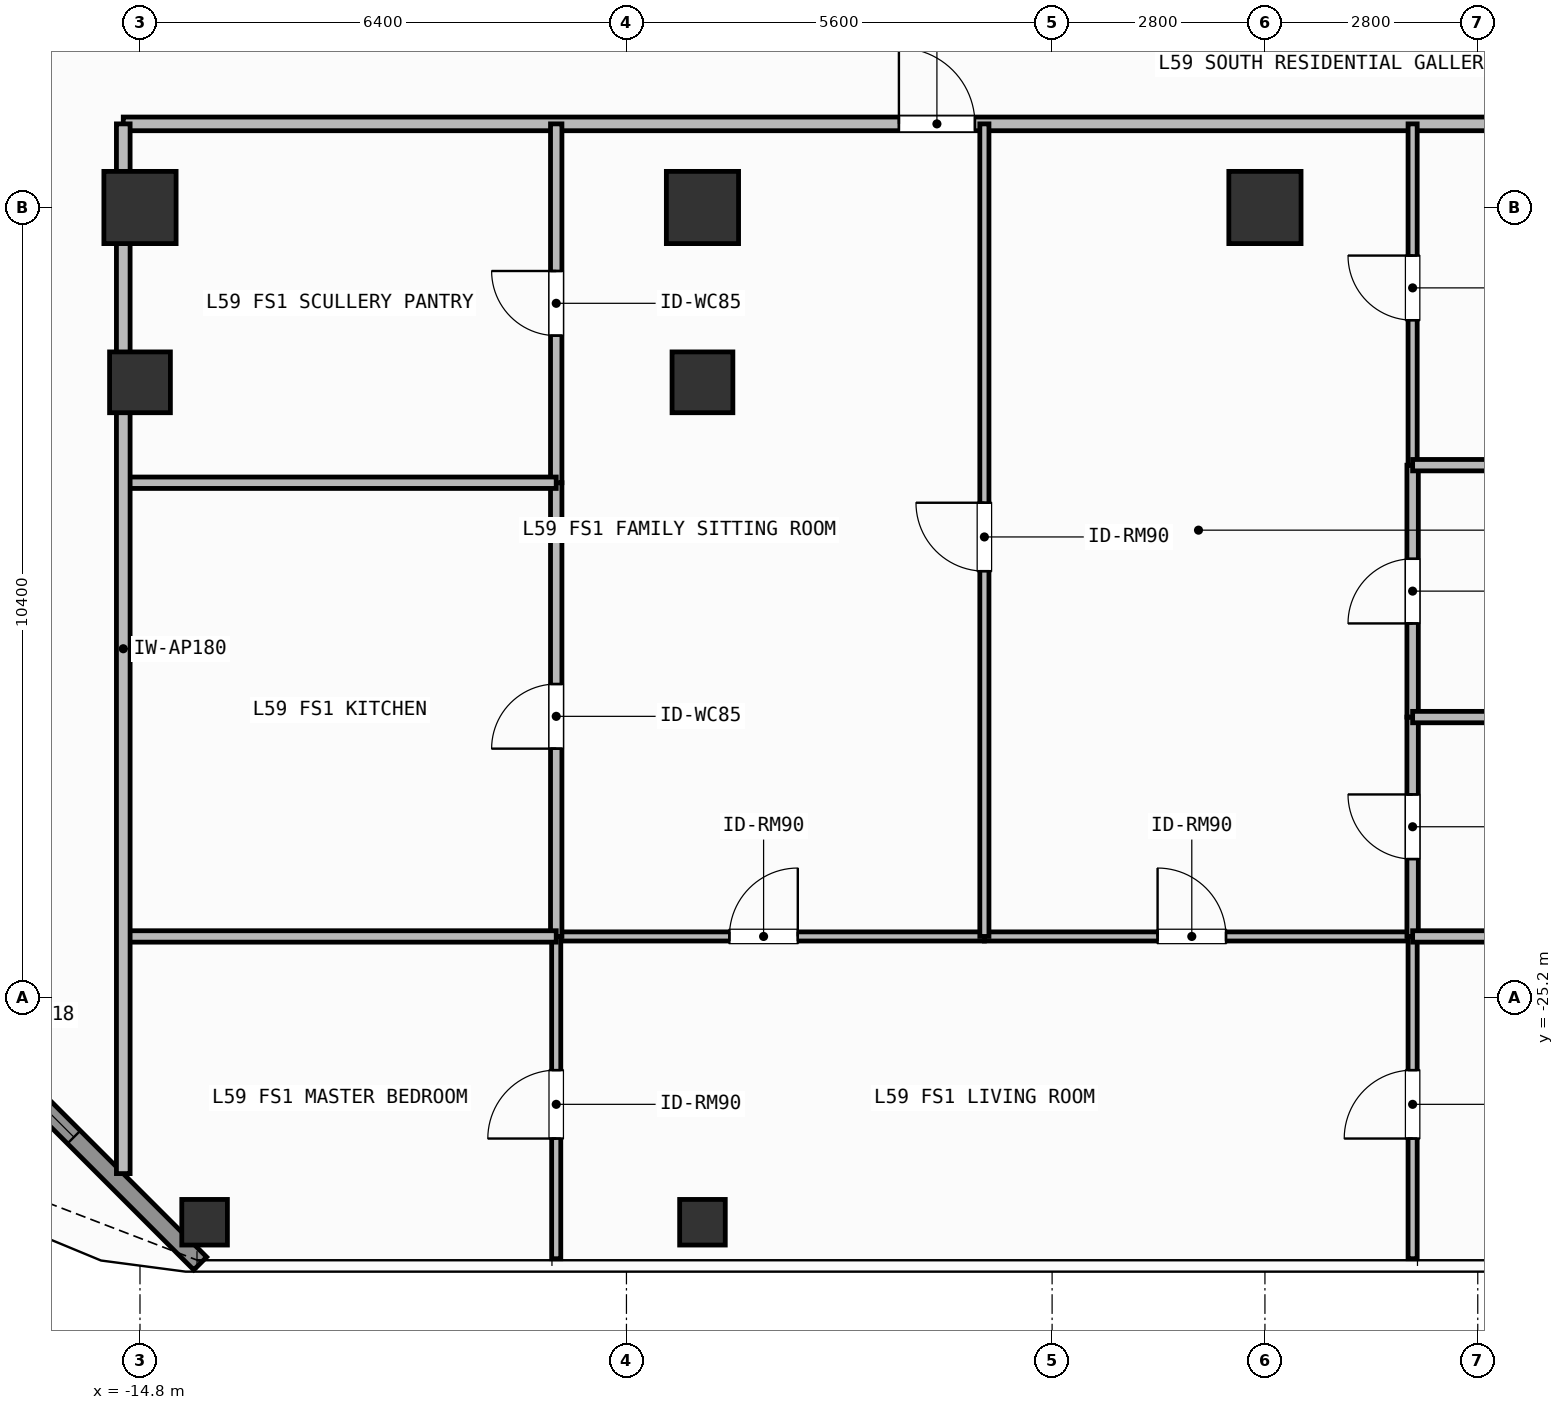
"""IFC4 building model, lengths in metres.
Left out: names, types, materials, properties, quantities, classifications, styles, units other than length and angle.
Written with IfcOpenShell. Run it as: python <this file> out.ifc"""

import sys

from ifc_helpers import new_model, si_unit, direction, frame, frame_2d, origin, origin_2d, place, context, subcontext, project, spatial, rectangle, hollow_rectangle, extrude, element, fill, save


model = new_model("IFC4")
c1 = context("Model", 3, precision=1e-05, world=origin(), true_north=direction((0.0, 1.0)))
c2 = subcontext(c1, "Body", "Model", "MODEL_VIEW")
j1 = project(units=[si_unit("LENGTHUNIT", "METRE"), si_unit("PLANEANGLEUNIT", "RADIAN")], contexts=[c1])
p1 = place(None, origin())
s1 = spatial("IfcSite", under=j1, at=p1, CompositionType="ELEMENT")
p2 = place(p1, origin())
s2 = spatial("IfcBuilding", under=s1, at=p2, CompositionType="ELEMENT")
p3 = place(p2, frame((0.0, 0.0, 243.0)))
s3 = spatial("IfcBuildingStorey", under=s2, at=p3, CompositionType="ELEMENT", Elevation=243.0)
for number, where, z_axis, x_axis in (
    (1, (-14.8, -14.8, 0.0), (0.0, 0.0, 1.0), (1.0, 0.0, 0.0)),
    (2, (-7.4, -14.8, 0.0), (0.0, 0.0, 1.0), (1.0, 0.0, 0.0)),
    (3, (0.0, -14.8, 0.0), (0.0, 0.0, 1.0), (1.0, 0.0, 0.0)),
):
    element("IfcColumn", number, at=place(p3, frame(where, z_axis=z_axis, x_axis=x_axis)), inside=s3, PredefinedType="COLUMN", context=c2, shape_type="SweptSolid", body=[
        extrude(rectangle(XDim=0.95, YDim=0.95, at=origin_2d()), origin(), (0.0, 0.0, 1.0), 3.9),
    ])
for number, where, z_axis, x_axis in (
    (4, (-14.8, -17.1, 0.0), (0.0, 0.0, 1.0), (1.0, 0.0, 0.0)),
    (5, (-7.4, -17.1, 0.0), (0.0, 0.0, 1.0), (1.0, 0.0, 0.0)),
):
    element("IfcColumn", number, at=place(p3, frame(where, z_axis=z_axis, x_axis=x_axis)), inside=s3, PredefinedType="COLUMN", context=c2, shape_type="SweptSolid", body=[
        extrude(hollow_rectangle(XDim=0.8, YDim=0.8, WallThickness=0.036, at=origin_2d()), origin(), (0.0, 0.0, 1.0), 3.9),
    ])
for number, where, z_axis, x_axis in (
    (6, (-13.95, -28.15, 0.0), (0.0, 0.0, 1.0), (1.0, 0.0, 0.0)),
    (7, (-7.4, -28.15, 0.0), (0.0, 0.0, 1.0), (1.0, 0.0, 0.0)),
):
    element("IfcColumn", number, at=place(p3, frame(where, z_axis=z_axis, x_axis=x_axis)), inside=s3, PredefinedType="COLUMN", context=c2, shape_type="SweptSolid", body=[
        extrude(hollow_rectangle(XDim=0.6, YDim=0.6, WallThickness=0.028, at=origin_2d()), origin(), (0.0, 0.0, 1.0), 3.9),
    ])
p4 = place(p3, frame((-14.008, -28.692, 0.0), z_axis=(0.0, 0.0, 1.0), x_axis=(-0.707106781187, 0.707106781187, 0.0)))
e8 = element("IfcWall", 8, at=p4, inside=s3, PredefinedType="SOLIDWALL", context=c2, shape_type="SweptSolid", body=[
    extrude(rectangle(XDim=6.201, YDim=0.24, at=frame_2d((3.101, 0.0))), origin(), (0.0, 0.0, 1.0), 3.68),
])
p5 = place(p4, frame((2.351, 0.0, 0.8)))
e9 = element("IfcOpeningElement", 9, at=p5, cuts=e8, PredefinedType="OPENING", context=c2, shape_type="SweptSolid", body=[
    extrude(rectangle(XDim=1.5, YDim=1.85, at=frame_2d((0.75, 0.925))), frame((0.0, 0.13, 0.0), z_axis=(0.0, -1.0, 0.0), x_axis=(1.0, 0.0, 0.0)), (0.0, 0.0, 1.0), 0.26),
])
p6 = place(p3, frame((-15.02, -13.7, 0.0), z_axis=(0.0, 0.0, 1.0), x_axis=(1.0, 0.0, 0.0)))
e10 = element("IfcWall", 10, at=p6, inside=s3, PredefinedType="PARTITIONING", context=c2, shape_type="SweptSolid", body=[
    extrude(rectangle(XDim=21.947, YDim=0.18, at=frame_2d((10.974, 0.0))), origin(), (0.0, 0.0, 1.0), 3.68),
])
p7 = place(p6, frame((10.205, 0.0, 0.0)))
e11 = element("IfcOpeningElement", 11, at=p7, cuts=e10, PredefinedType="OPENING", context=c2, shape_type="SweptSolid", body=[
    extrude(rectangle(XDim=1.0, YDim=2.2, at=frame_2d((0.5, 1.1))), frame((0.0, 0.1, 0.0), z_axis=(0.0, -1.0, 0.0), x_axis=(1.0, 0.0, 0.0)), (0.0, 0.0, 1.0), 0.2),
])
p8 = place(p3, frame((-9.324, -24.39, 0.0), z_axis=(0.0, 0.0, 1.0), x_axis=(1.0, 0.0, 0.0)))
e12 = element("IfcWall", 12, at=p8, inside=s3, PredefinedType="PARTITIONING", context=c2, shape_type="SweptSolid", body=[
    extrude(rectangle(XDim=5.633, YDim=0.12, at=frame_2d((2.816, 0.0))), origin(), (0.0, 0.0, 1.0), 3.68),
])
p9 = place(p8, frame((2.278, 0.0, 0.0)))
e13 = element("IfcOpeningElement", 13, at=p9, cuts=e12, PredefinedType="OPENING", context=c2, shape_type="SweptSolid", body=[
    extrude(rectangle(XDim=0.9, YDim=2.1, at=frame_2d((0.45, 1.05))), frame((0.0, 0.07, 0.0), z_axis=(0.0, -1.0, 0.0), x_axis=(1.0, 0.0, 0.0)), (0.0, 0.0, 1.0), 0.14),
])
p10 = place(p3, frame((-3.691, -24.39, 0.0), z_axis=(0.0, 0.0, 1.0), x_axis=(1.0, 0.0, 0.0)))
e14 = element("IfcWall", 14, at=p10, inside=s3, PredefinedType="PARTITIONING", context=c2, shape_type="SweptSolid", body=[
    extrude(rectangle(XDim=5.634, YDim=0.12, at=frame_2d((2.817, 0.0))), origin(), (0.0, 0.0, 1.0), 3.68),
])
p11 = place(p10, frame((2.279, 0.0, 0.0)))
e15 = element("IfcOpeningElement", 15, at=p11, cuts=e14, PredefinedType="OPENING", context=c2, shape_type="SweptSolid", body=[
    extrude(rectangle(XDim=0.9, YDim=2.1, at=frame_2d((0.45, 1.05))), frame((0.0, 0.07, 0.0), z_axis=(0.0, -1.0, 0.0), x_axis=(1.0, 0.0, 0.0)), (0.0, 0.0, 1.0), 0.14),
])
p12 = place(p3, frame((-3.691, -24.39, 0.0), z_axis=(0.0, 0.0, 1.0), x_axis=(0.0, 1.0, 0.0)))
e16 = element("IfcWall", 16, at=p12, inside=s3, PredefinedType="PARTITIONING", context=c2, shape_type="SweptSolid", body=[
    extrude(rectangle(XDim=10.69, YDim=0.12, at=frame_2d((5.345, 0.0))), origin(), (0.0, 0.0, 1.0), 3.68),
])
p13 = place(p12, frame((4.806, 0.0, 0.0)))
e17 = element("IfcOpeningElement", 17, at=p13, cuts=e16, PredefinedType="OPENING", context=c2, shape_type="SweptSolid", body=[
    extrude(rectangle(XDim=0.9, YDim=2.1, at=frame_2d((0.45, 1.05))), frame((0.0, 0.07, 0.0), z_axis=(0.0, -1.0, 0.0), x_axis=(1.0, 0.0, 0.0)), (0.0, 0.0, 1.0), 0.14),
])
p14 = place(p3, frame((-9.324, -24.39, 0.0), z_axis=(0.0, 0.0, 1.0), x_axis=(0.0, 1.0, 0.0)))
e18 = element("IfcWall", 18, at=p14, inside=s3, PredefinedType="PARTITIONING", context=c2, shape_type="SweptSolid", body=[
    extrude(rectangle(XDim=5.969, YDim=0.15, at=frame_2d((2.984, 0.0))), origin(), (0.0, 0.0, 1.0), 3.68),
])
p15 = place(p14, frame((2.471, 0.0, 0.0)))
e19 = element("IfcOpeningElement", 19, at=p15, cuts=e18, PredefinedType="OPENING", context=c2, shape_type="SweptSolid", body=[
    extrude(rectangle(XDim=0.85, YDim=2.1, at=frame_2d((0.425, 1.05))), frame((0.0, 0.085, 0.0), z_axis=(0.0, -1.0, 0.0), x_axis=(1.0, 0.0, 0.0)), (0.0, 0.0, 1.0), 0.17),
])
p16 = place(p3, frame((-9.324, -18.421, 0.0), z_axis=(0.0, 0.0, 1.0), x_axis=(0.0, 1.0, 0.0)))
e20 = element("IfcWall", 20, at=p16, inside=s3, PredefinedType="PARTITIONING", context=c2, shape_type="SweptSolid", body=[
    extrude(rectangle(XDim=4.721, YDim=0.15, at=frame_2d((2.36, 0.0))), origin(), (0.0, 0.0, 1.0), 3.68),
])
p17 = place(p16, frame((1.936, 0.0, 0.0)))
e21 = element("IfcOpeningElement", 21, at=p17, cuts=e20, PredefinedType="OPENING", context=c2, shape_type="SweptSolid", body=[
    extrude(rectangle(XDim=0.85, YDim=2.1, at=frame_2d((0.425, 1.05))), frame((0.0, 0.085, 0.0), z_axis=(0.0, -1.0, 0.0), x_axis=(1.0, 0.0, 0.0)), (0.0, 0.0, 1.0), 0.17),
])
p18 = place(p3, frame((-9.324, -28.63, 0.0), z_axis=(0.0, 0.0, 1.0), x_axis=(0.0, 1.0, 0.0)))
e22 = element("IfcWall", 22, at=p18, inside=s3, PredefinedType="PARTITIONING", context=c2, shape_type="SweptSolid", body=[
    extrude(rectangle(XDim=4.24, YDim=0.12, at=frame_2d((2.12, 0.0))), origin(), (0.0, 0.0, 1.0), 3.68),
])
p19 = place(p18, frame((1.581, 0.0, 0.0)))
e23 = element("IfcOpeningElement", 23, at=p19, cuts=e22, PredefinedType="OPENING", context=c2, shape_type="SweptSolid", body=[
    extrude(rectangle(XDim=0.9, YDim=2.1, at=frame_2d((0.45, 1.05))), frame((0.0, 0.07, 0.0), z_axis=(0.0, -1.0, 0.0), x_axis=(1.0, 0.0, 0.0)), (0.0, 0.0, 1.0), 0.14),
])
p20 = place(p3, frame((1.943, -24.39, 0.0), z_axis=(0.0, 0.0, 1.0), x_axis=(0.0, 1.0, 0.0)))
e24 = element("IfcWall", 24, at=p20, inside=s3, PredefinedType="PARTITIONING", context=c2, shape_type="SweptSolid", body=[
    extrude(rectangle(XDim=2.886, YDim=0.15, at=frame_2d((1.443, 0.0))), origin(), (0.0, 0.0, 1.0), 3.68),
])
p21 = place(p20, frame((1.018, 0.0, 0.0)))
e25 = element("IfcOpeningElement", 25, at=p21, cuts=e24, PredefinedType="OPENING", context=c2, shape_type="SweptSolid", body=[
    extrude(rectangle(XDim=0.85, YDim=2.1, at=frame_2d((0.425, 1.05))), frame((0.0, 0.085, 0.0), z_axis=(0.0, -1.0, 0.0), x_axis=(1.0, 0.0, 0.0)), (0.0, 0.0, 1.0), 0.17),
])
p22 = place(p3, frame((1.943, -21.504, 0.0), z_axis=(0.0, 0.0, 1.0), x_axis=(0.0, 1.0, 0.0)))
e26 = element("IfcWall", 26, at=p22, inside=s3, PredefinedType="PARTITIONING", context=c2, shape_type="SweptSolid", body=[
    extrude(rectangle(XDim=3.314, YDim=0.15, at=frame_2d((1.657, 0.0))), origin(), (0.0, 0.0, 1.0), 3.68),
])
p23 = place(p22, frame((1.232, 0.0, 0.0)))
e27 = element("IfcOpeningElement", 27, at=p23, cuts=e26, PredefinedType="OPENING", context=c2, shape_type="SweptSolid", body=[
    extrude(rectangle(XDim=0.85, YDim=2.1, at=frame_2d((0.425, 1.05))), frame((0.0, 0.085, 0.0), z_axis=(0.0, -1.0, 0.0), x_axis=(1.0, 0.0, 0.0)), (0.0, 0.0, 1.0), 0.17),
])
p24 = place(p3, frame((1.943, -18.19, 0.0), z_axis=(0.0, 0.0, 1.0), x_axis=(0.0, 1.0, 0.0)))
e28 = element("IfcWall", 28, at=p24, inside=s3, PredefinedType="PARTITIONING", context=c2, shape_type="SweptSolid", body=[
    extrude(rectangle(XDim=4.49, YDim=0.12, at=frame_2d((2.245, 0.0))), origin(), (0.0, 0.0, 1.0), 3.68),
])
p25 = place(p24, frame((1.907, 0.0, 0.0)))
e29 = element("IfcOpeningElement", 29, at=p25, cuts=e28, PredefinedType="OPENING", context=c2, shape_type="SweptSolid", body=[
    extrude(rectangle(XDim=0.85, YDim=2.1, at=frame_2d((0.425, 1.05))), frame((0.0, 0.07, 0.0), z_axis=(0.0, -1.0, 0.0), x_axis=(1.0, 0.0, 0.0)), (0.0, 0.0, 1.0), 0.14),
])
p26 = place(p3, frame((1.943, -28.63, 0.0), z_axis=(0.0, 0.0, 1.0), x_axis=(0.0, 1.0, 0.0)))
e30 = element("IfcWall", 30, at=p26, inside=s3, PredefinedType="PARTITIONING", context=c2, shape_type="SweptSolid", body=[
    extrude(rectangle(XDim=4.24, YDim=0.12, at=frame_2d((2.12, 0.0))), origin(), (0.0, 0.0, 1.0), 3.68),
])
p27 = place(p26, frame((1.581, 0.0, 0.0)))
e31 = element("IfcOpeningElement", 31, at=p27, cuts=e30, PredefinedType="OPENING", context=c2, shape_type="SweptSolid", body=[
    extrude(rectangle(XDim=0.9, YDim=2.1, at=frame_2d((0.45, 1.05))), frame((0.0, 0.07, 0.0), z_axis=(0.0, -1.0, 0.0), x_axis=(1.0, 0.0, 0.0)), (0.0, 0.0, 1.0), 0.14),
])
for number, where, z_axis, x_axis in (
    (32, (-15.02, -18.421, 0.0), (0.0, 0.0, 1.0), (1.0, 0.0, 0.0)),
    (33, (-15.02, -24.39, 0.0), (0.0, 0.0, 1.0), (1.0, 0.0, 0.0)),
):
    element("IfcWall", number, at=place(p3, frame(where, z_axis=z_axis, x_axis=x_axis)), inside=s3, PredefinedType="PARTITIONING", context=c2, shape_type="SweptSolid", body=[
        extrude(rectangle(XDim=5.696, YDim=0.15, at=frame_2d((2.848, 0.0))), origin(), (0.0, 0.0, 1.0), 3.68),
    ])
for number, where, z_axis, x_axis in (
    (34, (1.943, -21.504, 0.0), (0.0, 0.0, 1.0), (1.0, 0.0, 0.0)),
    (35, (1.943, -18.19, 0.0), (0.0, 0.0, 1.0), (1.0, 0.0, 0.0)),
    (36, (1.943, -24.39, 0.0), (0.0, 0.0, 1.0), (1.0, 0.0, 0.0)),
):
    element("IfcWall", number, at=place(p3, frame(where, z_axis=z_axis, x_axis=x_axis)), inside=s3, PredefinedType="PARTITIONING", context=c2, shape_type="SweptSolid", body=[
        extrude(rectangle(XDim=4.984, YDim=0.15, at=frame_2d((2.492, 0.0))), origin(), (0.0, 0.0, 1.0), 3.68),
    ])
p28 = place(p3, frame((-15.02, -27.51, 0.0), z_axis=(0.0, 0.0, 1.0), x_axis=(0.0, 1.0, 0.0)))
e37 = element("IfcWall", 37, at=p28, inside=s3, PredefinedType="PARTITIONING", context=c2, shape_type="SweptSolid", body=[
    extrude(rectangle(XDim=13.81, YDim=0.18, at=frame_2d((6.905, 0.0))), origin(), (0.0, 0.0, 1.0), 3.68),
])
p29 = place(p5, origin())
e38 = element("IfcWindow", 38, at=p29, inside=s3, PartitioningType="SINGLE_PANEL", PredefinedType="WINDOW", context=c2, shape_type="SweptSolid", body=[
    extrude(rectangle(XDim=1.5, YDim=1.85, at=frame_2d((0.75, 0.925))), frame((0.0, 0.03, 0.0), z_axis=(0.0, -1.0, 0.0), x_axis=(1.0, 0.0, 0.0)), (0.0, 0.0, 1.0), 0.06),
])
fill(e9, e38)
p30 = place(p7, origin())
e39 = element("IfcDoor", 39, at=p30, inside=s3, OperationType="SINGLE_SWING_LEFT", PredefinedType="DOOR", context=c2, shape_type="SweptSolid", body=[
    extrude(rectangle(XDim=1.0, YDim=2.2, at=frame_2d((0.5, 1.1))), frame((0.0, 0.025, 0.0), z_axis=(0.0, -1.0, 0.0), x_axis=(1.0, 0.0, 0.0)), (0.0, 0.0, 1.0), 0.05),
])
fill(e11, e39)
p31 = place(p9, origin())
e40 = element("IfcDoor", 40, at=p31, inside=s3, OperationType="SINGLE_SWING_RIGHT", PredefinedType="DOOR", context=c2, shape_type="SweptSolid", body=[
    extrude(rectangle(XDim=0.9, YDim=2.1, at=frame_2d((0.45, 1.05))), frame((0.0, 0.025, 0.0), z_axis=(0.0, -1.0, 0.0), x_axis=(1.0, 0.0, 0.0)), (0.0, 0.0, 1.0), 0.05),
])
fill(e13, e40)
p32 = place(p11, origin())
e41 = element("IfcDoor", 41, at=p32, inside=s3, OperationType="SINGLE_SWING_LEFT", PredefinedType="DOOR", context=c2, shape_type="SweptSolid", body=[
    extrude(rectangle(XDim=0.9, YDim=2.1, at=frame_2d((0.45, 1.05))), frame((0.0, 0.025, 0.0), z_axis=(0.0, -1.0, 0.0), x_axis=(1.0, 0.0, 0.0)), (0.0, 0.0, 1.0), 0.05),
])
fill(e15, e41)
p33 = place(p13, origin())
e42 = element("IfcDoor", 42, at=p33, inside=s3, OperationType="SINGLE_SWING_RIGHT", PredefinedType="DOOR", context=c2, shape_type="SweptSolid", body=[
    extrude(rectangle(XDim=0.9, YDim=2.1, at=frame_2d((0.45, 1.05))), frame((0.0, 0.025, 0.0), z_axis=(0.0, -1.0, 0.0), x_axis=(1.0, 0.0, 0.0)), (0.0, 0.0, 1.0), 0.05),
])
fill(e17, e42)
p34 = place(p15, origin())
e43 = element("IfcDoor", 43, at=p34, inside=s3, OperationType="SINGLE_SWING_LEFT", PredefinedType="DOOR", context=c2, shape_type="SweptSolid", body=[
    extrude(rectangle(XDim=0.85, YDim=2.1, at=frame_2d((0.425, 1.05))), frame((0.0, 0.025, 0.0), z_axis=(0.0, -1.0, 0.0), x_axis=(1.0, 0.0, 0.0)), (0.0, 0.0, 1.0), 0.05),
])
fill(e19, e43)
p35 = place(p17, origin())
e44 = element("IfcDoor", 44, at=p35, inside=s3, OperationType="SINGLE_SWING_RIGHT", PredefinedType="DOOR", context=c2, shape_type="SweptSolid", body=[
    extrude(rectangle(XDim=0.85, YDim=2.1, at=frame_2d((0.425, 1.05))), frame((0.0, 0.025, 0.0), z_axis=(0.0, -1.0, 0.0), x_axis=(1.0, 0.0, 0.0)), (0.0, 0.0, 1.0), 0.05),
])
fill(e21, e44)
p36 = place(p19, origin())
e45 = element("IfcDoor", 45, at=p36, inside=s3, OperationType="SINGLE_SWING_LEFT", PredefinedType="DOOR", context=c2, shape_type="SweptSolid", body=[
    extrude(rectangle(XDim=0.9, YDim=2.1, at=frame_2d((0.45, 1.05))), frame((0.0, 0.025, 0.0), z_axis=(0.0, -1.0, 0.0), x_axis=(1.0, 0.0, 0.0)), (0.0, 0.0, 1.0), 0.05),
])
fill(e23, e45)
p37 = place(p21, origin())
e46 = element("IfcDoor", 46, at=p37, inside=s3, OperationType="SINGLE_SWING_RIGHT", PredefinedType="DOOR", context=c2, shape_type="SweptSolid", body=[
    extrude(rectangle(XDim=0.85, YDim=2.1, at=frame_2d((0.425, 1.05))), frame((0.0, 0.025, 0.0), z_axis=(0.0, -1.0, 0.0), x_axis=(1.0, 0.0, 0.0)), (0.0, 0.0, 1.0), 0.05),
])
fill(e25, e46)
p38 = place(p23, origin())
e47 = element("IfcDoor", 47, at=p38, inside=s3, OperationType="SINGLE_SWING_LEFT", PredefinedType="DOOR", context=c2, shape_type="SweptSolid", body=[
    extrude(rectangle(XDim=0.85, YDim=2.1, at=frame_2d((0.425, 1.05))), frame((0.0, 0.025, 0.0), z_axis=(0.0, -1.0, 0.0), x_axis=(1.0, 0.0, 0.0)), (0.0, 0.0, 1.0), 0.05),
])
fill(e27, e47)
p39 = place(p25, origin())
e48 = element("IfcDoor", 48, at=p39, inside=s3, OperationType="SINGLE_SWING_RIGHT", PredefinedType="DOOR", context=c2, shape_type="SweptSolid", body=[
    extrude(rectangle(XDim=0.85, YDim=2.1, at=frame_2d((0.425, 1.05))), frame((0.0, 0.025, 0.0), z_axis=(0.0, -1.0, 0.0), x_axis=(1.0, 0.0, 0.0)), (0.0, 0.0, 1.0), 0.05),
])
fill(e29, e48)
p40 = place(p27, origin())
e49 = element("IfcDoor", 49, at=p40, inside=s3, OperationType="SINGLE_SWING_LEFT", PredefinedType="DOOR", context=c2, shape_type="SweptSolid", body=[
    extrude(rectangle(XDim=0.9, YDim=2.1, at=frame_2d((0.45, 1.05))), frame((0.0, 0.025, 0.0), z_axis=(0.0, -1.0, 0.0), x_axis=(1.0, 0.0, 0.0)), (0.0, 0.0, 1.0), 0.05),
])
fill(e31, e49)
save(model, sys.argv[1])
